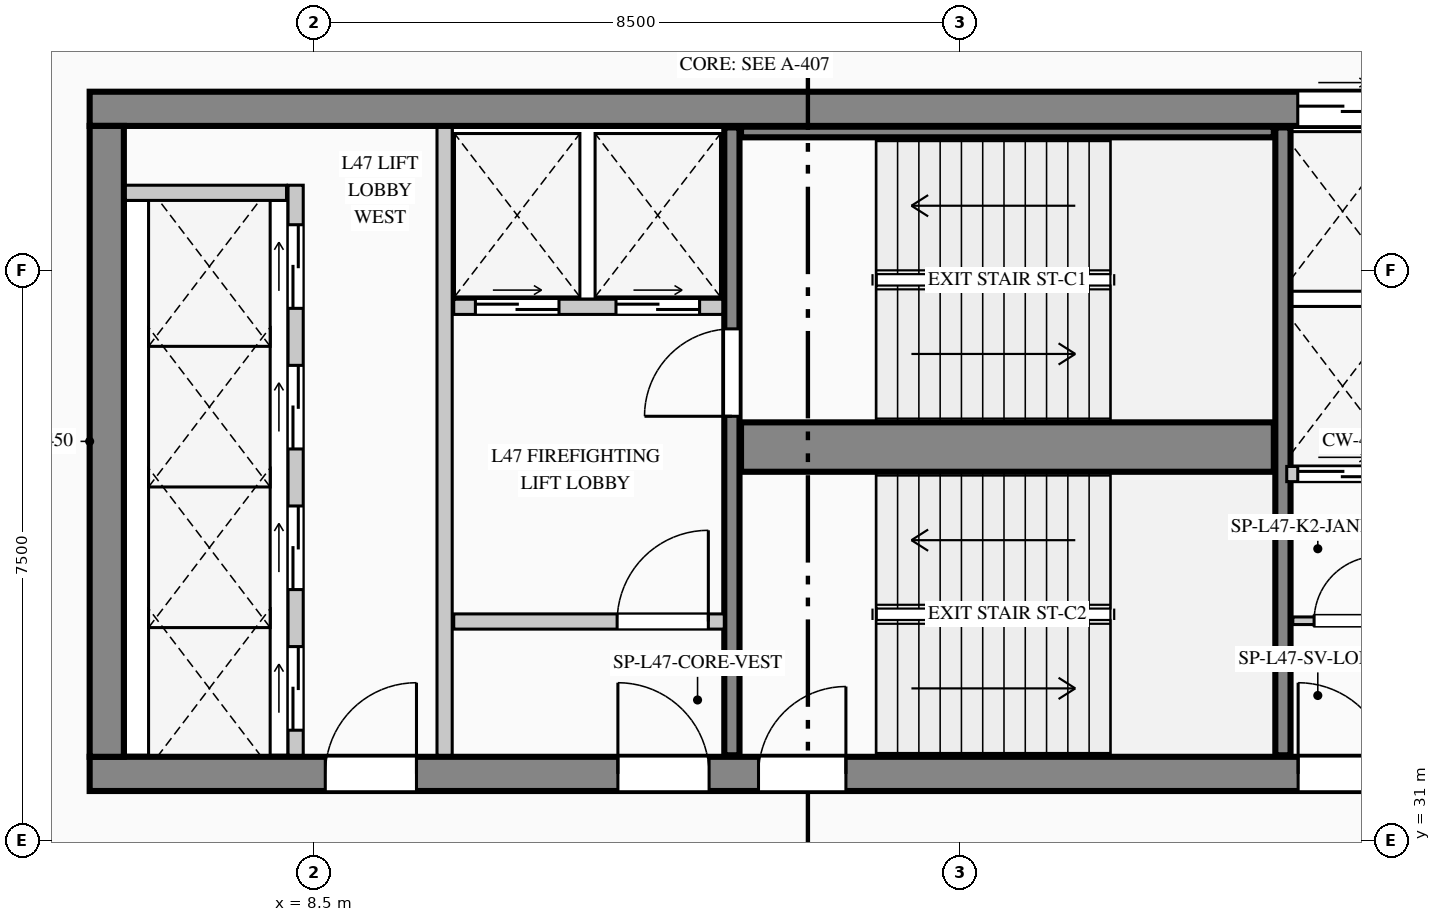
"""IFC4 building model, lengths in metres.
Left out: names, types, materials, properties, quantities, classifications, styles, units other than length and angle.
Written with IfcOpenShell. Run it as: python <this file> out.ifc"""

import sys

from ifc_helpers import new_model, si_unit, direction, frame, frame_2d, origin, place, context, subcontext, project, spatial, rectangle, extrude, element, fill, save


model = new_model("IFC4")
c1 = context("Model", 3, precision=1e-05, world=origin(), true_north=direction((0.0, 1.0)))
c2 = subcontext(c1, "Body", "Model", "MODEL_VIEW")
j1 = project(units=[si_unit("LENGTHUNIT", "METRE"), si_unit("PLANEANGLEUNIT", "RADIAN")], contexts=[c1])
p1 = place(None, origin())
s1 = spatial("IfcSite", under=j1, at=p1, CompositionType="ELEMENT")
p2 = place(p1, origin())
s2 = spatial("IfcBuilding", under=s1, at=p2, CompositionType="ELEMENT")
p3 = place(p2, frame((0.0, 0.0, 199.55)))
s3 = spatial("IfcBuildingStorey", under=s2, at=p3, CompositionType="ELEMENT", Elevation=199.55)
p4 = place(p3, frame((5.55, 40.625, 0.0), z_axis=(0.0, 0.0, 1.0), x_axis=(1.0, 0.0, 0.0)))
e1 = element("IfcWall", 1, at=p4, inside=s3, PredefinedType="SHEAR", context=c2, shape_type="SweptSolid", body=[
    extrude(rectangle(XDim=17.75, YDim=0.45, at=frame_2d((8.875, 0.0))), origin(), (0.0, 0.0, 1.0), 3.95),
])
p5 = place(p4, frame((15.895, 0.0, 0.0)))
e2 = element("IfcOpeningElement", 2, at=p5, cuts=e1, PredefinedType="OPENING", context=c2, shape_type="SweptSolid", body=[
    extrude(rectangle(XDim=1.18, YDim=2.25, at=frame_2d((0.59, 1.125))), frame((0.0, 0.235, 0.0), z_axis=(0.0, -1.0, 0.0), x_axis=(1.0, 0.0, 0.0)), (0.0, 0.0, 1.0), 0.47),
])
p6 = place(p3, frame((5.55, 31.875, 0.0), z_axis=(0.0, 0.0, 1.0), x_axis=(1.0, 0.0, 0.0)))
e3 = element("IfcWall", 3, at=p6, inside=s3, PredefinedType="SHEAR", context=c2, shape_type="SweptSolid", body=[
    extrude(rectangle(XDim=17.75, YDim=0.45, at=frame_2d((8.875, 0.0))), origin(), (0.0, 0.0, 1.0), 3.95),
])
p7 = place(p6, frame((3.1, 0.0, 0.0)))
e4 = element("IfcOpeningElement", 4, at=p7, cuts=e3, PredefinedType="OPENING", context=c2, shape_type="SweptSolid", body=[
    extrude(rectangle(XDim=1.2, YDim=2.2, at=frame_2d((0.6, 1.1))), frame((0.0, 0.235, 0.0), z_axis=(0.0, -1.0, 0.0), x_axis=(1.0, 0.0, 0.0)), (0.0, 0.0, 1.0), 0.47),
])
p8 = place(p6, frame((6.95, 0.0, 0.0)))
e5 = element("IfcOpeningElement", 5, at=p8, cuts=e3, PredefinedType="OPENING", context=c2, shape_type="SweptSolid", body=[
    extrude(rectangle(XDim=1.2, YDim=2.2, at=frame_2d((0.6, 1.1))), frame((0.0, 0.235, 0.0), z_axis=(0.0, -1.0, 0.0), x_axis=(1.0, 0.0, 0.0)), (0.0, 0.0, 1.0), 0.47),
])
p9 = place(p6, frame((8.8, 0.0, 0.0)))
e6 = element("IfcOpeningElement", 6, at=p9, cuts=e3, PredefinedType="OPENING", context=c2, shape_type="SweptSolid", body=[
    extrude(rectangle(XDim=1.15, YDim=2.2, at=frame_2d((0.575, 1.1))), frame((0.0, 0.235, 0.0), z_axis=(0.0, -1.0, 0.0), x_axis=(1.0, 0.0, 0.0)), (0.0, 0.0, 1.0), 0.47),
])
p10 = place(p6, frame((15.9, 0.0, 0.0)))
e7 = element("IfcOpeningElement", 7, at=p10, cuts=e3, PredefinedType="OPENING", context=c2, shape_type="SweptSolid", body=[
    extrude(rectangle(XDim=1.2, YDim=2.2, at=frame_2d((0.6, 1.1))), frame((0.0, 0.235, 0.0), z_axis=(0.0, -1.0, 0.0), x_axis=(1.0, 0.0, 0.0)), (0.0, 0.0, 1.0), 0.47),
])
p11 = place(p3, frame((5.775, 32.1, 0.0), z_axis=(0.0, 0.0, 1.0), x_axis=(0.0, 1.0, 0.0)))
e8 = element("IfcWall", 8, at=p11, inside=s3, PredefinedType="SHEAR", context=c2, shape_type="SweptSolid", body=[
    extrude(rectangle(XDim=8.3, YDim=0.45, at=frame_2d((4.15, 0.0))), origin(), (0.0, 0.0, 1.0), 3.95),
])
p12 = place(p3, frame((14.0, 32.12, 0.0), z_axis=(0.0, 0.0, 1.0), x_axis=(0.0, 1.0, 0.0)))
e9 = element("IfcWall", 9, at=p12, inside=s3, PredefinedType="SHEAR", context=c2, shape_type="SweptSolid", body=[
    extrude(rectangle(XDim=8.26, YDim=0.2, at=frame_2d((4.13, 0.0))), origin(), (0.0, 0.0, 1.0), 3.95),
])
p13 = place(p12, frame((4.46, 0.0, 0.0)))
e10 = element("IfcOpeningElement", 10, at=p13, cuts=e9, PredefinedType="OPENING", context=c2, shape_type="SweptSolid", body=[
    extrude(rectangle(XDim=1.15, YDim=2.2, at=frame_2d((0.575, 1.1))), frame((0.0, 0.11, 0.0), z_axis=(0.0, -1.0, 0.0), x_axis=(1.0, 0.0, 0.0)), (0.0, 0.0, 1.0), 0.22),
])
p14 = place(p3, frame((14.12, 36.175, 0.0), z_axis=(0.0, 0.0, 1.0), x_axis=(1.0, 0.0, 0.0)))
e11 = element("IfcWall", 11, at=p14, inside=s3, PredefinedType="SHEAR", context=c2, shape_type="SweptSolid", body=[
    extrude(rectangle(XDim=7.01, YDim=0.65, at=frame_2d((3.505, 0.0))), origin(), (0.0, 0.0, 1.0), 3.95),
])
p15 = place(p3, frame((21.25, 32.12, 0.0), z_axis=(0.0, 0.0, 1.0), x_axis=(0.0, 1.0, 0.0)))
e12 = element("IfcWall", 12, at=p15, inside=s3, PredefinedType="SHEAR", context=c2, shape_type="SweptSolid", body=[
    extrude(rectangle(XDim=8.26, YDim=0.2, at=frame_2d((4.13, 0.0))), origin(), (0.0, 0.0, 1.0), 3.95),
])
p16 = place(p3, frame((14.12, 40.32, 0.0), z_axis=(0.0, 0.0, 1.0), x_axis=(1.0, 0.0, 0.0)))
e13 = element("IfcWall", 13, at=p16, inside=s3, PredefinedType="SHEAR", context=c2, shape_type="SweptSolid", body=[
    extrude(rectangle(XDim=7.01, YDim=0.14, at=frame_2d((3.505, 0.0))), origin(), (0.0, 0.0, 1.0), 3.95),
])
p17 = place(p3, frame((7.469, 4.63, 0.0), z_axis=(0.0, 0.0, 1.0), x_axis=(-0.123515300309, 0.992342667928, 0.0)))
e14 = element("IfcWall", 14, at=p17, inside=s3, PredefinedType="STANDARD", context=c2, shape_type="SweptSolid", body=[
    extrude(rectangle(XDim=37.024, YDim=0.26, at=frame_2d((18.512, 0.0))), origin(), (0.0, 0.0, 1.0), 3.7),
])
p18 = place(p17, frame((11.978, 0.0, 0.9)))
e15 = element("IfcOpeningElement", 15, at=p18, cuts=e14, PredefinedType="OPENING", context=c2, shape_type="SweptSolid", body=[
    extrude(rectangle(XDim=2.7, YDim=2.1, at=frame_2d((1.35, 1.05))), frame((0.0, 0.14, 0.0), z_axis=(0.0, -1.0, 0.0), x_axis=(1.0, 0.0, 0.0)), (0.0, 0.0, 1.0), 0.28),
])
p19 = place(p3, frame((8.26, 32.12, 0.0), z_axis=(0.0, 0.0, 1.0), x_axis=(0.0, 1.0, 0.0)))
e16 = element("IfcWall", 16, at=p19, inside=s3, PredefinedType="PARTITIONING", context=c2, shape_type="SweptSolid", body=[
    extrude(rectangle(XDim=7.5, YDim=0.2, at=frame_2d((3.75, 0.0))), origin(), (0.0, 0.0, 1.0), 3.7),
])
p20 = place(p19, frame((0.33, 0.0, 0.0)))
e17 = element("IfcOpeningElement", 17, at=p20, cuts=e16, PredefinedType="OPENING", context=c2, shape_type="SweptSolid", body=[
    extrude(rectangle(XDim=1.1, YDim=2.2, at=frame_2d((0.55, 1.1))), frame((0.0, 0.11, 0.0), z_axis=(0.0, -1.0, 0.0), x_axis=(1.0, 0.0, 0.0)), (0.0, 0.0, 1.0), 0.22),
])
p21 = place(p19, frame((2.18, 0.0, 0.0)))
e18 = element("IfcOpeningElement", 18, at=p21, cuts=e16, PredefinedType="OPENING", context=c2, shape_type="SweptSolid", body=[
    extrude(rectangle(XDim=1.1, YDim=2.2, at=frame_2d((0.55, 1.1))), frame((0.0, 0.11, 0.0), z_axis=(0.0, -1.0, 0.0), x_axis=(1.0, 0.0, 0.0)), (0.0, 0.0, 1.0), 0.22),
])
p22 = place(p19, frame((4.03, 0.0, 0.0)))
e19 = element("IfcOpeningElement", 19, at=p22, cuts=e16, PredefinedType="OPENING", context=c2, shape_type="SweptSolid", body=[
    extrude(rectangle(XDim=1.1, YDim=2.2, at=frame_2d((0.55, 1.1))), frame((0.0, 0.11, 0.0), z_axis=(0.0, -1.0, 0.0), x_axis=(1.0, 0.0, 0.0)), (0.0, 0.0, 1.0), 0.22),
])
p23 = place(p19, frame((5.88, 0.0, 0.0)))
e20 = element("IfcOpeningElement", 20, at=p23, cuts=e16, PredefinedType="OPENING", context=c2, shape_type="SweptSolid", body=[
    extrude(rectangle(XDim=1.1, YDim=2.2, at=frame_2d((0.55, 1.1))), frame((0.0, 0.11, 0.0), z_axis=(0.0, -1.0, 0.0), x_axis=(1.0, 0.0, 0.0)), (0.0, 0.0, 1.0), 0.22),
])
p24 = place(p3, frame((6.02, 39.52, 0.0), z_axis=(0.0, 0.0, 1.0), x_axis=(1.0, 0.0, 0.0)))
e21 = element("IfcWall", 21, at=p24, inside=s3, PredefinedType="PARTITIONING", context=c2, shape_type="SweptSolid", body=[
    extrude(rectangle(XDim=2.12, YDim=0.2, at=frame_2d((1.06, 0.0))), origin(), (0.0, 0.0, 1.0), 3.7),
])
p25 = place(p3, frame((10.22, 32.12, 0.0), z_axis=(0.0, 0.0, 1.0), x_axis=(0.0, 1.0, 0.0)))
e22 = element("IfcWall", 22, at=p25, inside=s3, PredefinedType="PARTITIONING", context=c2, shape_type="SweptSolid", body=[
    extrude(rectangle(XDim=8.26, YDim=0.2, at=frame_2d((4.13, 0.0))), origin(), (0.0, 0.0, 1.0), 3.7),
])
p26 = place(p3, frame((10.34, 38.02, 0.0), z_axis=(0.0, 0.0, 1.0), x_axis=(1.0, 0.0, 0.0)))
e23 = element("IfcWall", 23, at=p26, inside=s3, PredefinedType="PARTITIONING", context=c2, shape_type="SweptSolid", body=[
    extrude(rectangle(XDim=3.54, YDim=0.2, at=frame_2d((1.77, 0.0))), origin(), (0.0, 0.0, 1.0), 3.7),
])
p27 = place(p26, frame((0.285, 0.0, 0.0)))
e24 = element("IfcOpeningElement", 24, at=p27, cuts=e23, PredefinedType="OPENING", context=c2, shape_type="SweptSolid", body=[
    extrude(rectangle(XDim=1.1, YDim=2.2, at=frame_2d((0.55, 1.1))), frame((0.0, 0.11, 0.0), z_axis=(0.0, -1.0, 0.0), x_axis=(1.0, 0.0, 0.0)), (0.0, 0.0, 1.0), 0.22),
])
p28 = place(p26, frame((2.135, 0.0, 0.0)))
e25 = element("IfcOpeningElement", 25, at=p28, cuts=e23, PredefinedType="OPENING", context=c2, shape_type="SweptSolid", body=[
    extrude(rectangle(XDim=1.1, YDim=2.2, at=frame_2d((0.55, 1.1))), frame((0.0, 0.11, 0.0), z_axis=(0.0, -1.0, 0.0), x_axis=(1.0, 0.0, 0.0)), (0.0, 0.0, 1.0), 0.22),
])
p29 = place(p3, frame((10.34, 33.88, 0.0), z_axis=(0.0, 0.0, 1.0), x_axis=(1.0, 0.0, 0.0)))
e26 = element("IfcWall", 26, at=p29, inside=s3, PredefinedType="PARTITIONING", context=c2, shape_type="SweptSolid", body=[
    extrude(rectangle(XDim=3.56, YDim=0.2, at=frame_2d((1.78, 0.0))), origin(), (0.0, 0.0, 1.0), 3.7),
])
p30 = place(p29, frame((2.15, 0.0, 0.0)))
e27 = element("IfcOpeningElement", 27, at=p30, cuts=e26, PredefinedType="OPENING", context=c2, shape_type="SweptSolid", body=[
    extrude(rectangle(XDim=1.2, YDim=2.2, at=frame_2d((0.6, 1.1))), frame((0.0, 0.11, 0.0), z_axis=(0.0, -1.0, 0.0), x_axis=(1.0, 0.0, 0.0)), (0.0, 0.0, 1.0), 0.22),
])
p31 = place(p3, frame((21.38, 33.89, 0.0), z_axis=(0.0, 0.0, 1.0), x_axis=(1.0, 0.0, 0.0)))
e28 = element("IfcWall", 28, at=p31, inside=s3, PredefinedType="PARTITIONING", context=c2, shape_type="SweptSolid", body=[
    extrude(rectangle(XDim=1.42, YDim=0.1, at=frame_2d((0.71, 0.0))), origin(), (0.0, 0.0, 1.0), 3.7),
])
p32 = place(p31, frame((0.28, 0.0, 0.0)))
e29 = element("IfcOpeningElement", 29, at=p32, cuts=e28, PredefinedType="OPENING", context=c2, shape_type="SweptSolid", body=[
    extrude(rectangle(XDim=0.85, YDim=2.1, at=frame_2d((0.425, 1.05))), frame((0.0, 0.06, 0.0), z_axis=(0.0, -1.0, 0.0), x_axis=(1.0, 0.0, 0.0)), (0.0, 0.0, 1.0), 0.12),
])
p33 = place(p3, frame((21.3, 35.82, 0.0), z_axis=(0.0, 0.0, 1.0), x_axis=(1.0, 0.0, 0.0)))
e30 = element("IfcWall", 30, at=p33, inside=s3, PredefinedType="PARTITIONING", context=c2, shape_type="SweptSolid", body=[
    extrude(rectangle(XDim=1.5, YDim=0.2, at=frame_2d((0.75, 0.0))), origin(), (0.0, 0.0, 1.0), 3.7),
])
p34 = place(p33, frame((0.145, 0.0, 0.0)))
e31 = element("IfcOpeningElement", 31, at=p34, cuts=e30, PredefinedType="OPENING", context=c2, shape_type="SweptSolid", body=[
    extrude(rectangle(XDim=1.18, YDim=2.25, at=frame_2d((0.59, 1.125))), frame((0.0, 0.11, 0.0), z_axis=(0.0, -1.0, 0.0), x_axis=(1.0, 0.0, 0.0)), (0.0, 0.0, 1.0), 0.22),
])
p35 = place(p7, origin())
e32 = element("IfcDoor", 32, at=p35, inside=s3, OperationType="SINGLE_SWING_RIGHT", PredefinedType="DOOR", context=c2, shape_type="SweptSolid", body=[
    extrude(rectangle(XDim=1.2, YDim=2.2, at=frame_2d((0.6, 1.1))), frame((0.0, 0.025, 0.0), z_axis=(0.0, -1.0, 0.0), x_axis=(1.0, 0.0, 0.0)), (0.0, 0.0, 1.0), 0.05),
])
fill(e4, e32)
p36 = place(p8, origin())
e33 = element("IfcDoor", 33, at=p36, inside=s3, OperationType="SINGLE_SWING_LEFT", PredefinedType="DOOR", context=c2, shape_type="SweptSolid", body=[
    extrude(rectangle(XDim=1.2, YDim=2.2, at=frame_2d((0.6, 1.1))), frame((0.0, 0.025, 0.0), z_axis=(0.0, -1.0, 0.0), x_axis=(1.0, 0.0, 0.0)), (0.0, 0.0, 1.0), 0.05),
])
fill(e5, e33)
p37 = place(p9, origin())
e34 = element("IfcDoor", 34, at=p37, inside=s3, OperationType="SINGLE_SWING_RIGHT", PredefinedType="DOOR", context=c2, shape_type="SweptSolid", body=[
    extrude(rectangle(XDim=1.15, YDim=2.2, at=frame_2d((0.575, 1.1))), frame((0.0, 0.025, 0.0), z_axis=(0.0, -1.0, 0.0), x_axis=(1.0, 0.0, 0.0)), (0.0, 0.0, 1.0), 0.05),
])
fill(e6, e34)
p38 = place(p10, origin())
e35 = element("IfcDoor", 35, at=p38, inside=s3, OperationType="SINGLE_SWING_LEFT", PredefinedType="DOOR", context=c2, shape_type="SweptSolid", body=[
    extrude(rectangle(XDim=1.2, YDim=2.2, at=frame_2d((0.6, 1.1))), frame((0.0, 0.025, 0.0), z_axis=(0.0, -1.0, 0.0), x_axis=(1.0, 0.0, 0.0)), (0.0, 0.0, 1.0), 0.05),
])
fill(e7, e35)
p39 = place(p30, origin())
e36 = element("IfcDoor", 36, at=p39, inside=s3, OperationType="SINGLE_SWING_RIGHT", PredefinedType="DOOR", context=c2, shape_type="SweptSolid", body=[
    extrude(rectangle(XDim=1.2, YDim=2.2, at=frame_2d((0.6, 1.1))), frame((0.0, 0.025, 0.0), z_axis=(0.0, -1.0, 0.0), x_axis=(1.0, 0.0, 0.0)), (0.0, 0.0, 1.0), 0.05),
])
fill(e27, e36)
p40 = place(p32, origin())
e37 = element("IfcDoor", 37, at=p40, inside=s3, OperationType="SINGLE_SWING_RIGHT", PredefinedType="DOOR", context=c2, shape_type="SweptSolid", body=[
    extrude(rectangle(XDim=0.85, YDim=2.1, at=frame_2d((0.425, 1.05))), frame((0.0, 0.025, 0.0), z_axis=(0.0, -1.0, 0.0), x_axis=(1.0, 0.0, 0.0)), (0.0, 0.0, 1.0), 0.05),
])
fill(e29, e37)
p41 = place(p13, origin())
e38 = element("IfcDoor", 38, at=p41, inside=s3, OperationType="SINGLE_SWING_LEFT", PredefinedType="DOOR", context=c2, shape_type="SweptSolid", body=[
    extrude(rectangle(XDim=1.15, YDim=2.2, at=frame_2d((0.575, 1.1))), frame((0.0, 0.025, 0.0), z_axis=(0.0, -1.0, 0.0), x_axis=(1.0, 0.0, 0.0)), (0.0, 0.0, 1.0), 0.05),
])
fill(e10, e38)
p42 = place(p20, origin())
e39 = element("IfcDoor", 39, at=p42, inside=s3, OperationType="DOUBLE_DOOR_SLIDING", PredefinedType="DOOR", context=c2, shape_type="SweptSolid", body=[
    extrude(rectangle(XDim=1.1, YDim=2.2, at=frame_2d((0.55, 1.1))), frame((0.0, 0.025, 0.0), z_axis=(0.0, -1.0, 0.0), x_axis=(1.0, 0.0, 0.0)), (0.0, 0.0, 1.0), 0.05),
])
fill(e17, e39)
p43 = place(p21, origin())
e40 = element("IfcDoor", 40, at=p43, inside=s3, OperationType="DOUBLE_DOOR_SLIDING", PredefinedType="DOOR", context=c2, shape_type="SweptSolid", body=[
    extrude(rectangle(XDim=1.1, YDim=2.2, at=frame_2d((0.55, 1.1))), frame((0.0, 0.025, 0.0), z_axis=(0.0, -1.0, 0.0), x_axis=(1.0, 0.0, 0.0)), (0.0, 0.0, 1.0), 0.05),
])
fill(e18, e40)
p44 = place(p22, origin())
e41 = element("IfcDoor", 41, at=p44, inside=s3, OperationType="DOUBLE_DOOR_SLIDING", PredefinedType="DOOR", context=c2, shape_type="SweptSolid", body=[
    extrude(rectangle(XDim=1.1, YDim=2.2, at=frame_2d((0.55, 1.1))), frame((0.0, 0.025, 0.0), z_axis=(0.0, -1.0, 0.0), x_axis=(1.0, 0.0, 0.0)), (0.0, 0.0, 1.0), 0.05),
])
fill(e19, e41)
p45 = place(p23, origin())
e42 = element("IfcDoor", 42, at=p45, inside=s3, OperationType="DOUBLE_DOOR_SLIDING", PredefinedType="DOOR", context=c2, shape_type="SweptSolid", body=[
    extrude(rectangle(XDim=1.1, YDim=2.2, at=frame_2d((0.55, 1.1))), frame((0.0, 0.025, 0.0), z_axis=(0.0, -1.0, 0.0), x_axis=(1.0, 0.0, 0.0)), (0.0, 0.0, 1.0), 0.05),
])
fill(e20, e42)
p46 = place(p27, origin())
e43 = element("IfcDoor", 43, at=p46, inside=s3, OperationType="DOUBLE_DOOR_SLIDING", PredefinedType="DOOR", context=c2, shape_type="SweptSolid", body=[
    extrude(rectangle(XDim=1.1, YDim=2.2, at=frame_2d((0.55, 1.1))), frame((0.0, 0.025, 0.0), z_axis=(0.0, -1.0, 0.0), x_axis=(1.0, 0.0, 0.0)), (0.0, 0.0, 1.0), 0.05),
])
fill(e24, e43)
p47 = place(p28, origin())
e44 = element("IfcDoor", 44, at=p47, inside=s3, OperationType="DOUBLE_DOOR_SLIDING", PredefinedType="DOOR", context=c2, shape_type="SweptSolid", body=[
    extrude(rectangle(XDim=1.1, YDim=2.2, at=frame_2d((0.55, 1.1))), frame((0.0, 0.025, 0.0), z_axis=(0.0, -1.0, 0.0), x_axis=(1.0, 0.0, 0.0)), (0.0, 0.0, 1.0), 0.05),
])
fill(e25, e44)
p48 = place(p5, origin())
e45 = element("IfcDoor", 45, at=p48, inside=s3, OperationType="DOUBLE_DOOR_SLIDING", PredefinedType="DOOR", context=c2, shape_type="SweptSolid", body=[
    extrude(rectangle(XDim=1.18, YDim=2.25, at=frame_2d((0.59, 1.125))), frame((0.0, 0.025, 0.0), z_axis=(0.0, -1.0, 0.0), x_axis=(1.0, 0.0, 0.0)), (0.0, 0.0, 1.0), 0.05),
])
fill(e2, e45)
p49 = place(p34, origin())
e46 = element("IfcDoor", 46, at=p49, inside=s3, OperationType="DOUBLE_DOOR_SLIDING", PredefinedType="DOOR", context=c2, shape_type="SweptSolid", body=[
    extrude(rectangle(XDim=1.18, YDim=2.25, at=frame_2d((0.59, 1.125))), frame((0.0, 0.025, 0.0), z_axis=(0.0, -1.0, 0.0), x_axis=(1.0, 0.0, 0.0)), (0.0, 0.0, 1.0), 0.05),
])
fill(e31, e46)
save(model, sys.argv[1])
